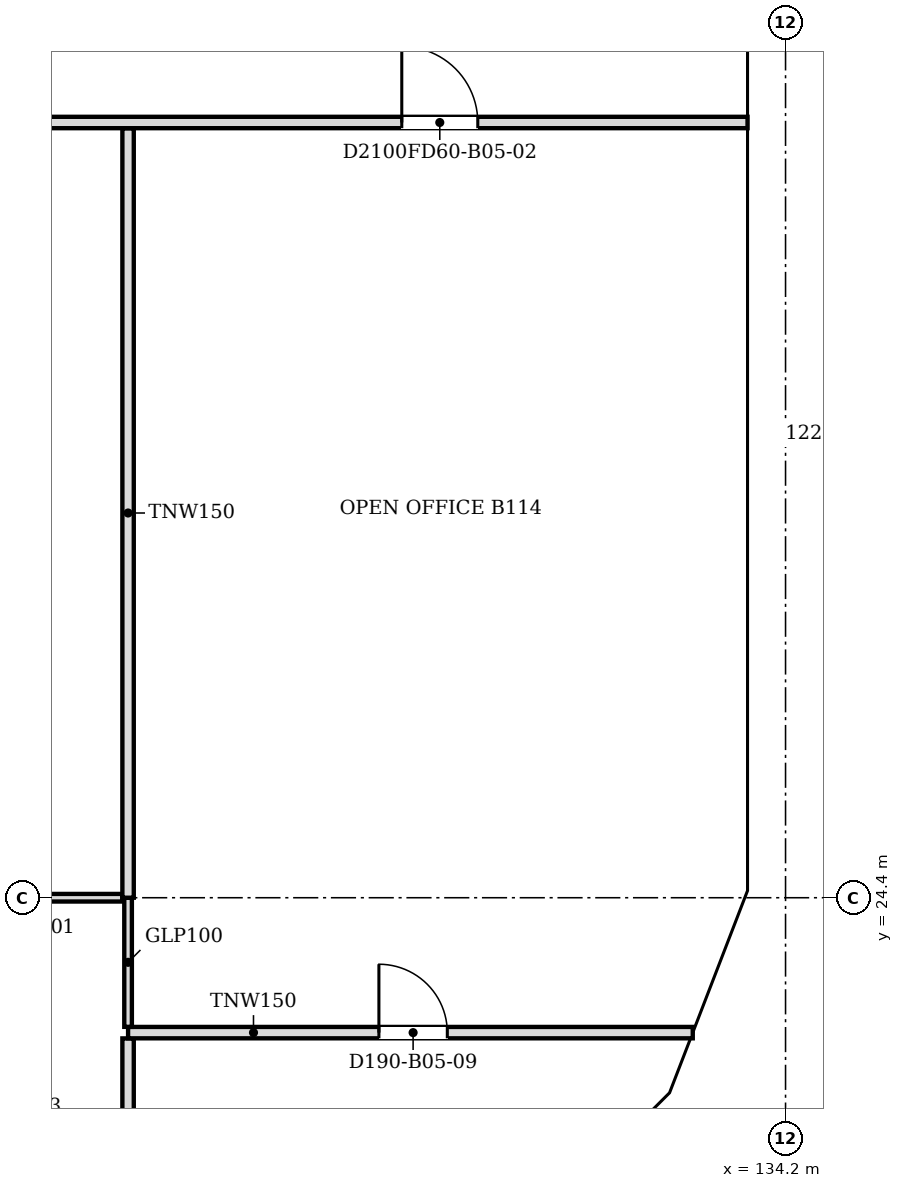
"""IFC4 building model, lengths in metres.
Left out: names, types, materials, properties, quantities, classifications, styles, units other than length and angle.
Written with IfcOpenShell. Run it as: python <this file> out.ifc"""

import sys

from ifc_helpers import new_model, si_unit, direction, frame, frame_2d, origin, place, context, subcontext, project, spatial, polyline, rectangle, outline, extrude, faceted_brep, source, transform, mapped, element, fill, save


model = new_model("IFC4")
c1 = context("Model", 3, precision=1e-05, world=origin(), true_north=direction((0.0, 1.0)))
c2 = subcontext(c1, "Body", "Model", "MODEL_VIEW")
j1 = project(units=[si_unit("LENGTHUNIT", "METRE"), si_unit("PLANEANGLEUNIT", "RADIAN")], contexts=[c1])
p1 = place(None, origin())
s1 = spatial("IfcSite", under=j1, at=p1, CompositionType="ELEMENT")
p2 = place(p1, origin())
s2 = spatial("IfcBuilding", under=s1, at=p2, CompositionType="ELEMENT")
p3 = place(p2, frame((0.0, 0.0, 52.4)))
s3 = spatial("IfcBuildingStorey", under=s2, at=p3, CompositionType="ELEMENT", Elevation=52.4)
m1 = source(origin(), c2, "Body", "Brep", [
    faceted_brep([(0.053, -0.25, 0.0), (2.997, -0.25, 3.8), (0.053, -0.25, 7.6), (0.0, -0.25, 7.532), (0.0, -0.25, 0.068), (0.106, 0.25, 7.531), (2.944, 0.25, 3.868), (2.944, 0.25, 3.732), (0.106, 0.25, 0.068), (2.997, 0.0, 3.8), (0.053, 0.0, 0.0), (0.053, 0.0, 7.6)], [[[0, 1, 2, 3, 4]], [[5, 6, 7, 8]], [[8, 7, 9, 1, 0, 10]], [[6, 5, 11, 2, 1, 9]], [[3, 2, 11]], [[10, 0, 4]], [[8, 10, 4, 3, 11, 5]], [[9, 7, 6]]]),
])
p4 = place(p3, frame((130.769, 19.574, -3.8), z_axis=(0.0, 0.0, 1.0), x_axis=(0.707106781187, 0.707106781187, 0.0)))
e1 = element("IfcWall", 1, at=p4, inside=s3, PredefinedType="SOLIDWALL", context=c2, shape_type="MappedRepresentation", body=[
    mapped(m1, transform((0.0, 0.0, 0.0), scale=1.0)),
])
m2 = source(origin(), c2, "Body", "SweptSolid", [
    extrude(outline(polyline([(0.253, 0.666), (2.681, 3.8), (0.253, 6.934), (0.253, 0.666)])), frame((0.0, 0.26, 0.0), z_axis=(0.0, -1.0, 0.0), x_axis=(1.0, 0.0, 0.0)), (0.0, 0.0, 1.0), 0.52),
])
p5 = place(p4, origin())
e2 = element("IfcOpeningElement", 2, at=p5, cuts=e1, PredefinedType="OPENING", context=c2, shape_type="MappedRepresentation", body=[
    mapped(m2, transform((0.0, 0.0, 0.0), scale=1.0)),
])
m3 = source(origin(), c2, "Body", "Brep", [
    faceted_brep([(2.95, -0.25, 0.0), (2.997, -0.25, 0.059), (2.997, -0.25, 7.541), (2.95, -0.25, 7.6), (0.0, -0.25, 3.8), (0.053, 0.25, 3.868), (2.904, 0.25, 7.54), (2.904, 0.25, 0.06), (0.053, 0.25, 3.732), (2.95, 0.0, 0.0), (2.95, 0.0, 7.6), (0.0, 0.0, 3.8)], [[[0, 1, 2, 3, 4]], [[5, 6, 7, 8]], [[1, 0, 9]], [[10, 3, 2]], [[6, 5, 11, 4, 3, 10]], [[8, 7, 9, 0, 4, 11]], [[8, 11, 5]], [[1, 9, 7, 6, 10, 2]]]),
])
p6 = place(p3, frame((132.888, 21.694, -3.8), z_axis=(0.0, 0.0, 1.0), x_axis=(0.359901446078, 0.932990326376, 0.0)))
e3 = element("IfcWall", 3, at=p6, inside=s3, PredefinedType="SOLIDWALL", context=c2, shape_type="MappedRepresentation", body=[
    mapped(m3, transform((0.0, 0.0, 0.0), scale=1.0)),
])
m4 = source(origin(), c2, "Body", "SweptSolid", [
    extrude(outline(polyline([(2.75, 6.935), (0.316, 3.8), (2.75, 0.665), (2.75, 6.935)])), frame((0.0, 0.26, 0.0), z_axis=(0.0, -1.0, 0.0), x_axis=(1.0, 0.0, 0.0)), (0.0, 0.0, 1.0), 0.52),
])
p7 = place(p6, origin())
e4 = element("IfcOpeningElement", 4, at=p7, cuts=e3, PredefinedType="OPENING", context=c2, shape_type="MappedRepresentation", body=[
    mapped(m4, transform((0.0, 0.0, 0.0), scale=1.0)),
])
m5 = source(origin(), c2, "Body", "Brep", [
    faceted_brep([(0.047, -0.25, 0.0), (3.05, -0.25, 3.8), (0.047, -0.25, 7.6), (0.0, -0.25, 7.54), (0.0, -0.25, 0.06), (0.093, 0.25, 7.541), (3.05, 0.25, 3.8), (0.093, 0.25, 0.059), (0.047, 0.0, 0.0), (0.047, 0.0, 7.6)], [[[0, 1, 2, 3, 4]], [[5, 6, 7]], [[7, 6, 1, 0, 8]], [[6, 5, 9, 2, 1]], [[3, 2, 9]], [[8, 0, 4]], [[7, 8, 4, 3, 9, 5]]]),
])
p8 = place(p3, frame((133.95, 24.4, -3.8), z_axis=(0.0, 0.0, 1.0), x_axis=(0.0, 1.0, 0.0)))
e5 = element("IfcWall", 5, at=p8, inside=s3, PredefinedType="SOLIDWALL", context=c2, shape_type="MappedRepresentation", body=[
    mapped(m5, transform((0.0, 0.0, 0.0), scale=1.0)),
])
m6 = source(origin(), c2, "Body", "SweptSolid", [
    extrude(outline(polyline([(0.247, 0.656), (2.731, 3.8), (0.247, 6.944), (0.247, 0.656)])), frame((0.0, 0.26, 0.0), z_axis=(0.0, -1.0, 0.0), x_axis=(1.0, 0.0, 0.0)), (0.0, 0.0, 1.0), 0.52),
])
p9 = place(p8, origin())
e6 = element("IfcOpeningElement", 6, at=p9, cuts=e5, PredefinedType="OPENING", context=c2, shape_type="MappedRepresentation", body=[
    mapped(m6, transform((0.0, 0.0, 0.0), scale=1.0)),
])
m7 = source(origin(), c2, "Body", "SweptSolid", [
    extrude(outline(polyline([(3.05, 0.0), (6.1, 3.8), (3.05, 7.6), (0.0, 3.8), (3.05, 0.0)])), frame((0.0, 0.25, 0.0), z_axis=(0.0, -1.0, 0.0), x_axis=(1.0, 0.0, 0.0)), (0.0, 0.0, 1.0), 0.5),
])
p10 = place(p3, frame((133.95, 27.45, -3.8), z_axis=(0.0, 0.0, 1.0), x_axis=(0.0, 1.0, 0.0)))
e7 = element("IfcWall", 7, at=p10, inside=s3, PredefinedType="SOLIDWALL", context=c2, shape_type="MappedRepresentation", body=[
    mapped(m7, transform((0.0, 0.0, 0.0), scale=1.0)),
])
m8 = source(origin(), c2, "Body", "SweptSolid", [
    extrude(outline(polyline([(3.05, 0.399), (5.78, 3.8), (3.05, 7.2), (0.321, 3.8), (3.05, 0.399)])), frame((0.0, 0.26, 0.0), z_axis=(0.0, -1.0, 0.0), x_axis=(1.0, 0.0, 0.0)), (0.0, 0.0, 1.0), 0.52),
])
p11 = place(p10, origin())
e8 = element("IfcOpeningElement", 8, at=p11, cuts=e7, PredefinedType="OPENING", context=c2, shape_type="MappedRepresentation", body=[
    mapped(m8, transform((0.0, 0.0, 0.0), scale=1.0)),
])
m9 = source(origin(), c2, "Body", "Brep", [
    faceted_brep([(3.05, -0.25, 0.0), (6.1, -0.25, 3.8), (6.1, -0.25, 3.8), (3.05, -0.25, 7.6), (0.0, -0.25, 3.8), (0.0, 0.25, 3.8), (3.05, 0.25, 7.6), (6.1, 0.25, 3.8), (6.1, 0.25, 3.8), (3.05, 0.25, 0.0)], [[[0, 1, 2, 3, 4]], [[5, 6, 7, 8, 9]], [[9, 8, 1, 0]], [[7, 6, 3, 2]], [[6, 5, 4, 3]], [[5, 9, 0, 4]], [[1, 8, 7, 2]]]),
])
p12 = place(p3, frame((133.95, 33.55, -3.8), z_axis=(0.0, 0.0, 1.0), x_axis=(0.0, 1.0, 0.0)))
e9 = element("IfcWall", 9, at=p12, inside=s3, PredefinedType="SOLIDWALL", context=c2, shape_type="MappedRepresentation", body=[
    mapped(m9, transform((0.0, 0.0, 0.0), scale=1.0)),
])
p13 = place(p12, origin())
e10 = element("IfcOpeningElement", 10, at=p13, cuts=e9, PredefinedType="OPENING", context=c2, shape_type="MappedRepresentation", body=[
    mapped(m8, transform((0.0, 0.0, 0.0), scale=1.0)),
])
p14 = place(p2, frame((0.0, 0.0, 56.2)))
s4 = spatial("IfcBuildingStorey", under=s2, at=p14, CompositionType="ELEMENT", Elevation=56.2)
m10 = source(origin(), c2, "Body", "Brep", [
    faceted_brep([(2.944, -0.25, 0.0), (2.997, -0.25, 0.068), (2.997, -0.25, 7.532), (2.944, -0.25, 7.6), (0.0, -0.25, 3.8), (0.053, 0.25, 3.868), (2.891, 0.25, 7.532), (2.891, 0.25, 0.068), (0.053, 0.25, 3.732), (2.944, 0.0, 0.0), (2.944, 0.0, 7.6), (0.0, 0.0, 3.8)], [[[0, 1, 2, 3, 4]], [[5, 6, 7, 8]], [[1, 0, 9]], [[10, 3, 2]], [[6, 5, 11, 4, 3, 10]], [[8, 7, 9, 0, 4, 11]], [[8, 11, 5]], [[1, 9, 7, 6, 10, 2]]]),
])
p15 = place(p14, frame((130.806, 19.612, -3.8), z_axis=(0.0, 0.0, 1.0), x_axis=(0.707106781187, 0.707106781187, 0.0)))
e11 = element("IfcWall", 11, at=p15, inside=s4, PredefinedType="SOLIDWALL", context=c2, shape_type="MappedRepresentation", body=[
    mapped(m10, transform((0.0, 0.0, 0.0), scale=1.0)),
])
m11 = source(origin(), c2, "Body", "SweptSolid", [
    extrude(outline(polyline([(2.744, 6.934), (0.316, 3.8), (2.744, 0.667), (2.744, 6.934)])), frame((0.0, 0.26, 0.0), z_axis=(0.0, -1.0, 0.0), x_axis=(1.0, 0.0, 0.0)), (0.0, 0.0, 1.0), 0.52),
])
p16 = place(p15, origin())
e12 = element("IfcOpeningElement", 12, at=p16, cuts=e11, PredefinedType="OPENING", context=c2, shape_type="MappedRepresentation", body=[
    mapped(m11, transform((0.0, 0.0, 0.0), scale=1.0)),
])
m12 = source(origin(), c2, "Body", "Brep", [
    faceted_brep([(0.053, -0.25, 0.0), (3.003, -0.25, 3.8), (0.053, -0.25, 7.6), (0.0, -0.25, 7.532), (0.0, -0.25, 0.068), (0.106, 0.25, 7.532), (2.957, 0.25, 3.86), (2.957, 0.25, 3.74), (0.106, 0.25, 0.068), (3.003, 0.0, 3.8), (0.053, 0.0, 0.0), (0.053, 0.0, 7.6)], [[[0, 1, 2, 3, 4]], [[5, 6, 7, 8]], [[8, 7, 9, 1, 0, 10]], [[6, 5, 11, 2, 1, 9]], [[3, 2, 11]], [[10, 0, 4]], [[8, 10, 4, 3, 11, 5]], [[9, 7, 6]]]),
])
p17 = place(p14, frame((132.869, 21.644, -3.8), z_axis=(0.0, 0.0, 1.0), x_axis=(0.359855894603, 0.933007896601, 0.0)))
e13 = element("IfcWall", 13, at=p17, inside=s4, PredefinedType="SOLIDWALL", context=c2, shape_type="MappedRepresentation", body=[
    mapped(m12, transform((0.0, 0.0, 0.0), scale=1.0)),
])
m13 = source(origin(), c2, "Body", "SweptSolid", [
    extrude(outline(polyline([(0.253, 0.665), (2.687, 3.8), (0.253, 6.935), (0.253, 0.665)])), frame((0.0, 0.26, 0.0), z_axis=(0.0, -1.0, 0.0), x_axis=(1.0, 0.0, 0.0)), (0.0, 0.0, 1.0), 0.52),
])
p18 = place(p17, origin())
e14 = element("IfcOpeningElement", 14, at=p18, cuts=e13, PredefinedType="OPENING", context=c2, shape_type="MappedRepresentation", body=[
    mapped(m13, transform((0.0, 0.0, 0.0), scale=1.0)),
])
m14 = source(origin(), c2, "Body", "Brep", [
    faceted_brep([(3.003, -0.25, 0.0), (6.053, -0.25, 3.8), (3.003, -0.25, 7.6), (0.0, -0.25, 3.8), (0.047, 0.25, 3.859), (3.003, 0.25, 7.6), (6.053, 0.25, 3.8), (3.003, 0.25, 0.0), (0.047, 0.25, 3.741), (0.0, 0.0, 3.8)], [[[0, 1, 2, 3]], [[4, 5, 6, 7, 8]], [[7, 6, 1, 0]], [[6, 5, 2, 1]], [[5, 4, 9, 3, 2]], [[8, 7, 0, 3, 9]], [[8, 9, 4]]]),
])
p19 = place(p14, frame((133.95, 24.447, -3.8), z_axis=(0.0, 0.0, 1.0), x_axis=(0.0, 1.0, 0.0)))
e15 = element("IfcWall", 15, at=p19, inside=s4, PredefinedType="SOLIDWALL", context=c2, shape_type="MappedRepresentation", body=[
    mapped(m14, transform((0.0, 0.0, 0.0), scale=1.0)),
])
m15 = source(origin(), c2, "Body", "SweptSolid", [
    extrude(outline(polyline([(3.005, 0.401), (5.733, 3.8), (3.005, 7.199), (0.319, 3.8), (3.005, 0.401)])), frame((0.0, 0.26, 0.0), z_axis=(0.0, -1.0, 0.0), x_axis=(1.0, 0.0, 0.0)), (0.0, 0.0, 1.0), 0.52),
])
p20 = place(p19, origin())
e16 = element("IfcOpeningElement", 16, at=p20, cuts=e15, PredefinedType="OPENING", context=c2, shape_type="MappedRepresentation", body=[
    mapped(m15, transform((0.0, 0.0, 0.0), scale=1.0)),
])
m16 = source(origin(), c2, "Body", "SweptSolid", [
    extrude(outline(polyline([(3.05, 0.0), (6.1, 3.8), (3.05, 7.6), (0.0, 3.8), (3.05, 0.0)])), frame((0.0, 0.25, 0.0), z_axis=(0.0, -1.0, 0.0), x_axis=(1.0, 0.0, 0.0)), (0.0, 0.0, 1.0), 0.5),
])
p21 = place(p14, frame((133.95, 30.5, -3.8), z_axis=(0.0, 0.0, 1.0), x_axis=(0.0, 1.0, 0.0)))
e17 = element("IfcWall", 17, at=p21, inside=s4, PredefinedType="SOLIDWALL", context=c2, shape_type="MappedRepresentation", body=[
    mapped(m16, transform((0.0, 0.0, 0.0), scale=1.0)),
])
m17 = source(origin(), c2, "Body", "SweptSolid", [
    extrude(outline(polyline([(3.05, 0.399), (5.78, 3.8), (3.05, 7.201), (0.321, 3.8), (3.05, 0.399)])), frame((0.0, 0.26, 0.0), z_axis=(0.0, -1.0, 0.0), x_axis=(1.0, 0.0, 0.0)), (0.0, 0.0, 1.0), 0.52),
])
p22 = place(p21, origin())
e18 = element("IfcOpeningElement", 18, at=p22, cuts=e17, PredefinedType="OPENING", context=c2, shape_type="MappedRepresentation", body=[
    mapped(m17, transform((0.0, 0.0, 0.0), scale=1.0)),
])
p23 = place(p3, frame((125.55, 18.8, 0.0), z_axis=(0.0, 0.0, 1.0), x_axis=(0.0, 1.0, 0.0)))
e19 = element("IfcWall", 19, at=p23, inside=s3, PredefinedType="PARTITIONING", context=c2, shape_type="SweptSolid", body=[
    extrude(rectangle(XDim=3.749, YDim=0.15, at=frame_2d((1.875, 0.0))), origin(), (0.0, 0.0, 1.0), 3.067),
])
p24 = place(p3, frame((132.979, 22.625, 0.0), z_axis=(0.0, 0.0, 1.0), x_axis=(-1.0, 0.0, 0.0)))
e20 = element("IfcWall", 20, at=p24, inside=s3, PredefinedType="PARTITIONING", context=c2, shape_type="SweptSolid", body=[
    extrude(rectangle(XDim=7.429, YDim=0.15, at=frame_2d((3.715, 0.0))), origin(), (0.0, 0.0, 1.0), 3.067),
])
m18 = source(origin(), c2, "Body", "SweptSolid", [
    extrude(rectangle(XDim=0.9, YDim=2.1, at=frame_2d((0.45, 1.05))), frame((0.0, 0.085, 0.0), z_axis=(0.0, -1.0, 0.0), x_axis=(1.0, 0.0, 0.0)), (0.0, 0.0, 1.0), 0.17),
])
p25 = place(p24, frame((3.229, 0.0, 0.0)))
e21 = element("IfcOpeningElement", 21, at=p25, cuts=e20, PredefinedType="OPENING", context=c2, shape_type="MappedRepresentation", body=[
    mapped(m18, transform((0.0, 0.0, 0.0), scale=1.0)),
])
p26 = place(p3, frame((125.55, 22.701, 0.0), z_axis=(0.0, 0.0, 1.0), x_axis=(0.0, 1.0, 0.0)))
e22 = element("IfcWall", 22, at=p26, inside=s3, PredefinedType="PARTITIONING", context=c2, shape_type="SweptSolid", body=[
    extrude(rectangle(XDim=1.698, YDim=0.1, at=frame_2d((0.849, 0.0))), origin(), (0.0, 0.0, 1.0), 3.067),
])
p27 = place(p3, frame((125.474, 24.4, 0.0), z_axis=(0.0, 0.0, 1.0), x_axis=(-1.0, 0.0, 0.0)))
e23 = element("IfcWall", 23, at=p27, inside=s3, PredefinedType="PARTITIONING", context=c2, shape_type="SweptSolid", body=[
    extrude(rectangle(XDim=3.023, YDim=0.1, at=frame_2d((1.512, 0.0))), origin(), (0.0, 0.0, 1.0), 3.067),
])
m19 = source(origin(), c2, "Body", "SweptSolid", [
    extrude(rectangle(XDim=0.9, YDim=2.1, at=frame_2d((0.45, 1.05))), frame((0.0, 0.06, 0.0), z_axis=(0.0, -1.0, 0.0), x_axis=(1.0, 0.0, 0.0)), (0.0, 0.0, 1.0), 0.12),
])
p28 = place(p27, frame((1.023, 0.0, 0.0)))
e24 = element("IfcOpeningElement", 24, at=p28, cuts=e23, PredefinedType="OPENING", context=c2, shape_type="MappedRepresentation", body=[
    mapped(m19, transform((0.0, 0.0, 0.0), scale=1.0)),
])
p29 = place(p3, frame((125.55, 24.4, 0.0), z_axis=(0.0, 0.0, 1.0), x_axis=(0.0, 1.0, 0.0)))
e25 = element("IfcWall", 25, at=p29, inside=s3, PredefinedType="PARTITIONING", context=c2, shape_type="SweptSolid", body=[
    extrude(rectangle(XDim=10.124, YDim=0.15, at=frame_2d((5.062, 0.0))), origin(), (0.0, 0.0, 1.0), 3.067),
])
p30 = place(p3, frame((133.7, 34.6, 0.0), z_axis=(0.0, 0.0, 1.0), x_axis=(-1.0, 0.0, 0.0)))
e26 = element("IfcWall", 26, at=p30, inside=s3, PredefinedType="PARTITIONING", context=c2, shape_type="SweptSolid", body=[
    extrude(rectangle(XDim=47.8, YDim=0.15, at=frame_2d((23.9, 0.0))), origin(), (0.0, 0.0, 1.0), 3.067),
])
m20 = source(origin(), c2, "Body", "SweptSolid", [
    extrude(rectangle(XDim=1.0, YDim=2.1, at=frame_2d((0.5, 1.05))), frame((0.0, 0.085, 0.0), z_axis=(0.0, -1.0, 0.0), x_axis=(1.0, 0.0, 0.0)), (0.0, 0.0, 1.0), 0.17),
])
p31 = place(p30, frame((3.549, 0.0, 0.0)))
e27 = element("IfcOpeningElement", 27, at=p31, cuts=e26, PredefinedType="OPENING", context=c2, shape_type="MappedRepresentation", body=[
    mapped(m20, transform((0.0, 0.0, 0.0), scale=1.0)),
])
p32 = place(p30, frame((42.7, 0.0, 0.0)))
e28 = element("IfcOpeningElement", 28, at=p32, cuts=e26, PredefinedType="OPENING", context=c2, shape_type="MappedRepresentation", body=[
    mapped(m20, transform((0.0, 0.0, 0.0), scale=1.0)),
])
p33 = place(p30, frame((12.299, 0.0, 0.0)))
e29 = element("IfcOpeningElement", 29, at=p33, cuts=e26, PredefinedType="OPENING", context=c2, shape_type="MappedRepresentation", body=[
    mapped(m18, transform((0.0, 0.0, 0.0), scale=1.0)),
])
p34 = place(p30, frame((21.349, 0.0, 0.0)))
e30 = element("IfcOpeningElement", 30, at=p34, cuts=e26, PredefinedType="OPENING", context=c2, shape_type="MappedRepresentation", body=[
    mapped(m20, transform((0.0, 0.0, 0.0), scale=1.0)),
])
p35 = place(p30, frame((32.05, 0.0, 0.0)))
e31 = element("IfcOpeningElement", 31, at=p35, cuts=e26, PredefinedType="OPENING", context=c2, shape_type="MappedRepresentation", body=[
    mapped(m20, transform((0.0, 0.0, 0.0), scale=1.0)),
])
m21 = source(origin(), c2, "Body", "SweptSolid", [
    extrude(rectangle(XDim=0.9, YDim=2.1, at=frame_2d((0.45, 1.05))), frame((0.0, 0.025, 0.0), z_axis=(0.0, -1.0, 0.0), x_axis=(1.0, 0.0, 0.0)), (0.0, 0.0, 1.0), 0.05),
])
p36 = place(p25, origin())
e32 = element("IfcDoor", 32, at=p36, inside=s3, OperationType="SINGLE_SWING_RIGHT", PredefinedType="DOOR", context=c2, shape_type="MappedRepresentation", body=[
    mapped(m21, transform((0.0, 0.0, 0.0), scale=1.0)),
])
fill(e21, e32)
m22 = source(origin(), c2, "Body", "SweptSolid", [
    extrude(rectangle(XDim=1.0, YDim=2.1, at=frame_2d((0.5, 1.05))), frame((0.0, 0.025, 0.0), z_axis=(0.0, -1.0, 0.0), x_axis=(1.0, 0.0, 0.0)), (0.0, 0.0, 1.0), 0.05),
])
p37 = place(p31, origin())
e33 = element("IfcDoor", 33, at=p37, inside=s3, OperationType="SINGLE_SWING_RIGHT", PredefinedType="DOOR", context=c2, shape_type="MappedRepresentation", body=[
    mapped(m22, transform((0.0, 0.0, 0.0), scale=1.0)),
])
fill(e27, e33)
save(model, sys.argv[1])
